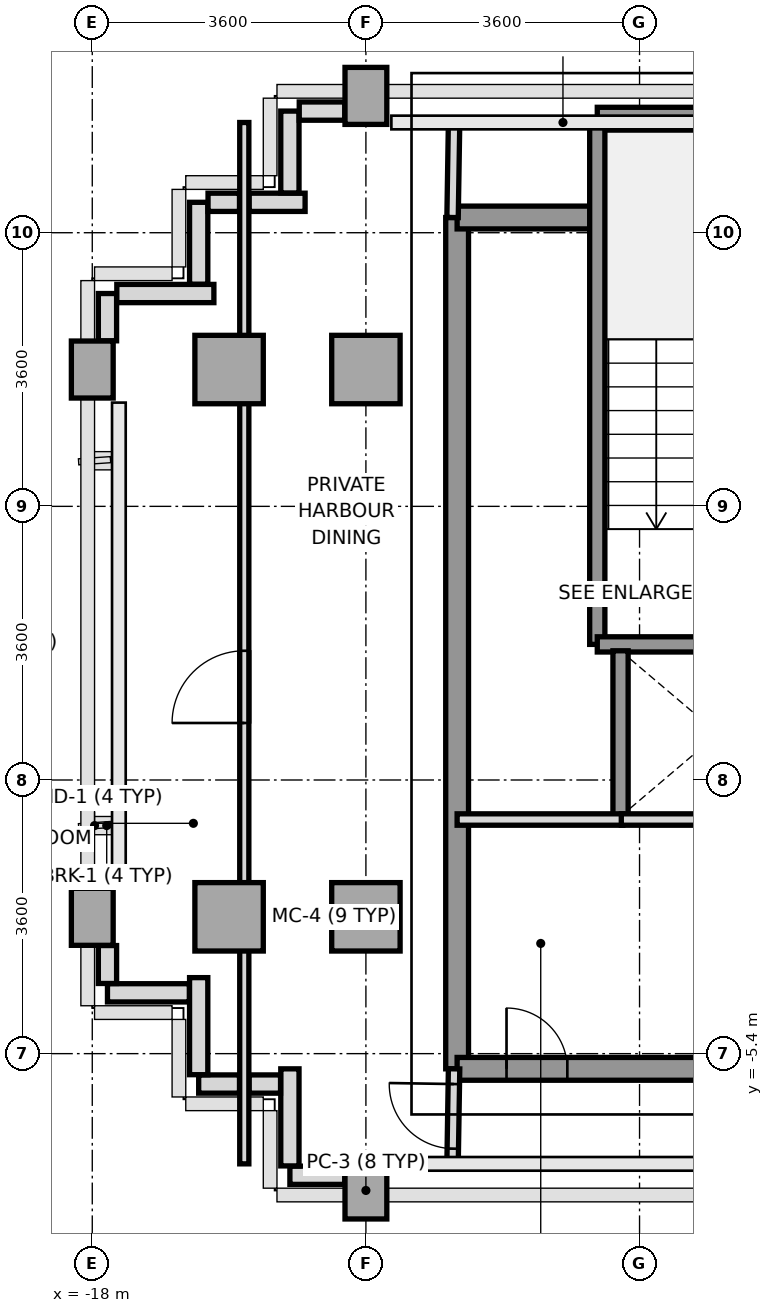
"""IFC4 building model, lengths in metres.
Left out: names, types, materials, properties, quantities, classifications, styles, units other than length and angle.
Written with IfcOpenShell. Run it as: python <this file> out.ifc"""

import sys

from ifc_helpers import new_model, si_unit, direction, frame, frame_2d, origin, origin_2d, place, context, subcontext, project, spatial, rectangle, extrude, source, transform, mapped, element, fill, save


model = new_model("IFC4")
c1 = context("Model", 3, precision=1e-05, world=origin(), true_north=direction((0.0, 1.0)))
c2 = subcontext(c1, "Body", "Model", "MODEL_VIEW")
j1 = project(units=[si_unit("LENGTHUNIT", "METRE"), si_unit("PLANEANGLEUNIT", "RADIAN")], contexts=[c1])
p1 = place(None, origin())
s1 = spatial("IfcSite", under=j1, at=p1, CompositionType="ELEMENT")
p2 = place(p1, origin())
s2 = spatial("IfcBuilding", under=s1, at=p2, CompositionType="ELEMENT")
p3 = place(p2, frame((0.0, 0.0, 246.0)))
s3 = spatial("IfcBuildingStorey", under=s2, at=p3, CompositionType="ELEMENT", Elevation=246.0)
m1 = source(origin(), c2, "Body", "SweptSolid", [
    extrude(rectangle(XDim=0.55, YDim=0.75, at=origin_2d()), origin(), (0.0, 0.0, 1.0), 3.01),
])
for number, where, z_axis, x_axis in (
    (1, (-18.0, -3.6, 0.0), (0.0, 0.0, 1.0), (1.0, 0.0, 0.0)),
    (2, (-18.0, 3.6, 0.0), (0.0, 0.0, 1.0), (1.0, 0.0, 0.0)),
):
    element("IfcColumn", number, at=place(p3, frame(where, z_axis=z_axis, x_axis=x_axis)), inside=s3, PredefinedType="COLUMN", context=c2, shape_type="MappedRepresentation", body=[
        mapped(m1, transform((0.0, 0.0, 0.0), x_axis=(1.0, 0.0, 0.0), y_axis=(0.0, 1.0, 0.0), z_axis=(0.0, 0.0, 1.0), scale=1.0)),
    ])
m2 = source(origin(), c2, "Body", "SweptSolid", [
    extrude(rectangle(XDim=0.9, YDim=0.9, at=origin_2d()), origin(), (0.0, 0.0, 1.0), 3.01),
])
for number, where, z_axis, x_axis in (
    (3, (-16.2, -3.6, 0.0), (0.0, 0.0, 1.0), (1.0, 0.0, 0.0)),
    (4, (-16.2, 3.6, 0.0), (0.0, 0.0, 1.0), (1.0, 0.0, 0.0)),
):
    element("IfcColumn", number, at=place(p3, frame(where, z_axis=z_axis, x_axis=x_axis)), inside=s3, PredefinedType="COLUMN", context=c2, shape_type="MappedRepresentation", body=[
        mapped(m2, transform((0.0, 0.0, 0.0), x_axis=(1.0, 0.0, 0.0), y_axis=(0.0, 1.0, 0.0), z_axis=(0.0, 0.0, 1.0), scale=1.0)),
    ])
p4 = place(p3, frame((-14.4, -7.2, 0.0), z_axis=(0.0, 0.0, 1.0), x_axis=(1.0, 0.0, 0.0)))
e5 = element("IfcColumn", 5, at=p4, inside=s3, PredefinedType="COLUMN", context=c2, shape_type="MappedRepresentation", body=[
    mapped(m1, transform((0.0, 0.0, 0.0), x_axis=(1.0, 0.0, 0.0), y_axis=(0.0, 1.0, 0.0), z_axis=(0.0, 0.0, 1.0), scale=1.0)),
])
for number, where, z_axis, x_axis in (
    (6, (-14.4, -3.6, 0.0), (0.0, 0.0, 1.0), (1.0, 0.0, 0.0)),
    (7, (-14.4, 3.6, 0.0), (0.0, 0.0, 1.0), (1.0, 0.0, 0.0)),
):
    element("IfcColumn", number, at=place(p3, frame(where, z_axis=z_axis, x_axis=x_axis)), inside=s3, PredefinedType="COLUMN", context=c2, shape_type="MappedRepresentation", body=[
        mapped(m2, transform((0.0, 0.0, 0.0), x_axis=(1.0, 0.0, 0.0), y_axis=(0.0, 1.0, 0.0), z_axis=(0.0, 0.0, 1.0), scale=1.0)),
    ])
p5 = place(p3, frame((-14.4, 7.2, 0.0), z_axis=(0.0, 0.0, 1.0), x_axis=(1.0, 0.0, 0.0)))
e8 = element("IfcColumn", 8, at=p5, inside=s3, PredefinedType="COLUMN", context=c2, shape_type="MappedRepresentation", body=[
    mapped(m1, transform((0.0, 0.0, 0.0), x_axis=(1.0, 0.0, 0.0), y_axis=(0.0, 1.0, 0.0), z_axis=(0.0, 0.0, 1.0), scale=1.0)),
])
p6 = place(p3, frame((-14.678, -7.0, 0.0), z_axis=(0.0, 0.0, 1.0), x_axis=(-1.0, 0.0, 0.0)))
e9 = element("IfcWall", 9, at=p6, inside=s3, PredefinedType="PARAPET", context=c2, shape_type="SweptSolid", body=[
    extrude(rectangle(XDim=0.722, YDim=0.24, at=frame_2d((0.361, 0.0))), origin(), (0.0, 0.0, 1.0), 1.15),
])
p7 = place(p3, frame((-15.4, -6.877, 0.0), z_axis=(0.0, 0.0, 1.0), x_axis=(0.0, 1.0, 0.0)))
e10 = element("IfcWall", 10, at=p7, inside=s3, PredefinedType="PARAPET", context=c2, shape_type="SweptSolid", body=[
    extrude(rectangle(XDim=1.277, YDim=0.24, at=frame_2d((0.638, 0.0))), origin(), (0.0, 0.0, 1.0), 1.15),
])
p8 = place(p3, frame((-15.523, -5.8, 0.0), z_axis=(0.0, 0.0, 1.0), x_axis=(-1.0, 0.0, 0.0)))
e11 = element("IfcWall", 11, at=p8, inside=s3, PredefinedType="PARAPET", context=c2, shape_type="SweptSolid", body=[
    extrude(rectangle(XDim=0.414, YDim=0.24, at=frame_2d((0.207, 0.0))), origin(), (0.0, 0.0, 1.0), 1.15),
])
p9 = place(p3, frame((-16.063, -5.8, 0.0), z_axis=(0.0, 0.0, 1.0), x_axis=(-1.0, 0.0, 0.0)))
e12 = element("IfcWall", 12, at=p9, inside=s3, PredefinedType="PARAPET", context=c2, shape_type="SweptSolid", body=[
    extrude(rectangle(XDim=0.537, YDim=0.24, at=frame_2d((0.269, 0.0))), origin(), (0.0, 0.0, 1.0), 1.15),
])
p10 = place(p3, frame((-16.6, -5.677, 0.0), z_axis=(0.0, 0.0, 1.0), x_axis=(0.0, 1.0, 0.0)))
e13 = element("IfcWall", 13, at=p10, inside=s3, PredefinedType="PARAPET", context=c2, shape_type="SweptSolid", body=[
    extrude(rectangle(XDim=1.277, YDim=0.24, at=frame_2d((0.639, 0.0))), origin(), (0.0, 0.0, 1.0), 1.15),
])
p11 = place(p3, frame((-16.723, -4.6, 0.0), z_axis=(0.0, 0.0, 1.0), x_axis=(-1.0, 0.0, 0.0)))
e14 = element("IfcWall", 14, at=p11, inside=s3, PredefinedType="PARAPET", context=c2, shape_type="SweptSolid", body=[
    extrude(rectangle(XDim=1.077, YDim=0.24, at=frame_2d((0.539, 0.0))), origin(), (0.0, 0.0, 1.0), 1.15),
])
p12 = place(p3, frame((-17.8, -4.477, 0.0), z_axis=(0.0, 0.0, 1.0), x_axis=(0.0, 1.0, 0.0)))
e15 = element("IfcWall", 15, at=p12, inside=s3, PredefinedType="PARAPET", context=c2, shape_type="SweptSolid", body=[
    extrude(rectangle(XDim=0.499, YDim=0.24, at=frame_2d((0.25, 0.0))), origin(), (0.0, 0.0, 1.0), 1.15),
])
p13 = place(p3, frame((-17.8, 3.978, 0.0), z_axis=(0.0, 0.0, 1.0), x_axis=(0.0, 1.0, 0.0)))
e16 = element("IfcWall", 16, at=p13, inside=s3, PredefinedType="PARAPET", context=c2, shape_type="SweptSolid", body=[
    extrude(rectangle(XDim=0.622, YDim=0.24, at=frame_2d((0.311, 0.0))), origin(), (0.0, 0.0, 1.0), 1.15),
])
p14 = place(p3, frame((-17.677, 4.6, 0.0), z_axis=(0.0, 0.0, 1.0), x_axis=(1.0, 0.0, 0.0)))
e17 = element("IfcWall", 17, at=p14, inside=s3, PredefinedType="PARAPET", context=c2, shape_type="SweptSolid", body=[
    extrude(rectangle(XDim=1.277, YDim=0.24, at=frame_2d((0.639, 0.0))), origin(), (0.0, 0.0, 1.0), 1.15),
])
p15 = place(p3, frame((-16.6, 4.723, 0.0), z_axis=(0.0, 0.0, 1.0), x_axis=(0.0, 1.0, 0.0)))
e18 = element("IfcWall", 18, at=p15, inside=s3, PredefinedType="PARAPET", context=c2, shape_type="SweptSolid", body=[
    extrude(rectangle(XDim=1.077, YDim=0.24, at=frame_2d((0.539, 0.0))), origin(), (0.0, 0.0, 1.0), 1.15),
])
p16 = place(p3, frame((-16.477, 5.8, 0.0), z_axis=(0.0, 0.0, 1.0), x_axis=(1.0, 0.0, 0.0)))
e19 = element("IfcWall", 19, at=p16, inside=s3, PredefinedType="PARAPET", context=c2, shape_type="SweptSolid", body=[
    extrude(rectangle(XDim=0.414, YDim=0.24, at=frame_2d((0.207, 0.0))), origin(), (0.0, 0.0, 1.0), 1.15),
])
p17 = place(p3, frame((-15.937, 5.8, 0.0), z_axis=(0.0, 0.0, 1.0), x_axis=(1.0, 0.0, 0.0)))
e20 = element("IfcWall", 20, at=p17, inside=s3, PredefinedType="PARAPET", context=c2, shape_type="SweptSolid", body=[
    extrude(rectangle(XDim=0.737, YDim=0.24, at=frame_2d((0.369, 0.0))), origin(), (0.0, 0.0, 1.0), 1.15),
])
p18 = place(p3, frame((-15.4, 5.923, 0.0), z_axis=(0.0, 0.0, 1.0), x_axis=(0.0, 1.0, 0.0)))
e21 = element("IfcWall", 21, at=p18, inside=s3, PredefinedType="PARAPET", context=c2, shape_type="SweptSolid", body=[
    extrude(rectangle(XDim=1.077, YDim=0.24, at=frame_2d((0.539, 0.0))), origin(), (0.0, 0.0, 1.0), 1.15),
])
p19 = place(p3, frame((-15.277, 7.0, 0.0), z_axis=(0.0, 0.0, 1.0), x_axis=(1.0, 0.0, 0.0)))
e22 = element("IfcWall", 22, at=p19, inside=s3, PredefinedType="PARAPET", context=c2, shape_type="SweptSolid", body=[
    extrude(rectangle(XDim=0.599, YDim=0.24, at=frame_2d((0.3, 0.0))), origin(), (0.0, 0.0, 1.0), 1.15),
])
p20 = place(p3, frame((-13.2, -5.6, 0.0), z_axis=(0.0, 0.0, 1.0), x_axis=(0.0, 1.0, 0.0)))
e23 = element("IfcWall", 23, at=p20, inside=s3, PredefinedType="SHEAR", context=c2, shape_type="SweptSolid", body=[
    extrude(rectangle(XDim=11.2, YDim=0.3, at=frame_2d((5.6, 0.0))), origin(), (0.0, 0.0, 1.0), 3.01),
])
p21 = place(p3, frame((-11.356, 6.9, 0.0), z_axis=(0.0, 0.0, 1.0), x_axis=(1.0, 0.0, 0.0)))
e24 = element("IfcWall", 24, at=p21, inside=s3, PredefinedType="SHEAR", context=c2, shape_type="SweptSolid", body=[
    extrude(rectangle(XDim=5.956, YDim=0.3, at=frame_2d((2.978, 0.0))), origin(), (0.0, 0.0, 1.0), 3.01),
])
p22 = place(p3, frame((-13.2, 5.6, 0.0), z_axis=(0.0, 0.0, 1.0), x_axis=(1.0, 0.0, 0.0)))
e25 = element("IfcWall", 25, at=p22, inside=s3, PredefinedType="SHEAR", context=c2, shape_type="SweptSolid", body=[
    extrude(rectangle(XDim=1.844, YDim=0.3, at=frame_2d((0.922, 0.0))), origin(), (0.0, 0.0, 1.0), 3.01),
])
p23 = place(p3, frame((-13.2, -5.6, 0.0), z_axis=(0.0, 0.0, 1.0), x_axis=(1.0, 0.0, 0.0)))
e26 = element("IfcWall", 26, at=p23, inside=s3, PredefinedType="SHEAR", context=c2, shape_type="SweptSolid", body=[
    extrude(rectangle(XDim=7.8, YDim=0.3, at=frame_2d((3.9, 0.0))), origin(), (0.0, 0.0, 1.0), 3.01),
])
p24 = place(p23, frame((0.65, 0.0, 0.0)))
e27 = element("IfcOpeningElement", 27, at=p24, cuts=e26, PredefinedType="OPENING", context=c2, shape_type="SweptSolid", body=[
    extrude(rectangle(XDim=0.8, YDim=2.1, at=frame_2d((0.4, 1.05))), frame((0.0, 0.16, 0.0), z_axis=(0.0, -1.0, 0.0), x_axis=(1.0, 0.0, 0.0)), (0.0, 0.0, 1.0), 0.32),
])
p25 = place(p23, frame((4.2, 0.0, 0.0)))
e28 = element("IfcOpeningElement", 28, at=p25, cuts=e26, PredefinedType="OPENING", context=c2, shape_type="SweptSolid", body=[
    extrude(rectangle(XDim=0.95, YDim=2.15, at=frame_2d((0.475, 1.075))), frame((0.0, 0.16, 0.0), z_axis=(0.0, -1.0, 0.0), x_axis=(1.0, 0.0, 0.0)), (0.0, 0.0, 1.0), 0.32),
])
p26 = place(p3, frame((-11.356, -0.016, 0.0), z_axis=(0.0, 0.0, 1.0), x_axis=(0.0, 1.0, 0.0)))
e29 = element("IfcWall", 29, at=p26, inside=s3, PredefinedType="SOLIDWALL", context=c2, shape_type="SweptSolid", body=[
    extrude(rectangle(XDim=6.916, YDim=0.2, at=frame_2d((3.458, 0.0))), origin(), (0.0, 0.0, 1.0), 3.01),
])
p27 = place(p3, frame((-11.356, -0.016, 0.0), z_axis=(0.0, 0.0, 1.0), x_axis=(1.0, 0.0, 0.0)))
e30 = element("IfcWall", 30, at=p27, inside=s3, PredefinedType="SOLIDWALL", context=c2, shape_type="SweptSolid", body=[
    extrude(rectangle(XDim=3.152, YDim=0.2, at=frame_2d((1.576, 0.0))), origin(), (0.0, 0.0, 1.0), 3.01),
])
p28 = place(p3, frame((-11.05, -2.28, 0.0), z_axis=(0.0, 0.0, 1.0), x_axis=(0.0, 1.0, 0.0)))
e31 = element("IfcWall", 31, at=p28, inside=s3, PredefinedType="SOLIDWALL", context=c2, shape_type="SweptSolid", body=[
    extrude(rectangle(XDim=2.18, YDim=0.2, at=frame_2d((1.09, 0.0))), origin(), (0.0, 0.0, 1.0), 3.01),
])
p29 = place(p3, frame((-13.2, -2.32, 0.0), z_axis=(0.0, 0.0, 1.0), x_axis=(1.0, 0.0, 0.0)))
e32 = element("IfcWall", 32, at=p29, inside=s3, PredefinedType="PARTITIONING", context=c2, shape_type="SweptSolid", body=[
    extrude(rectangle(XDim=2.18, YDim=0.15, at=frame_2d((1.09, 0.0))), origin(), (0.0, 0.0, 1.0), 3.01),
])
p30 = place(p3, frame((-11.04, -2.32, 0.0), z_axis=(0.0, 0.0, 1.0), x_axis=(1.0, 0.0, 0.0)))
e33 = element("IfcWall", 33, at=p30, inside=s3, PredefinedType="PARTITIONING", context=c2, shape_type="SweptSolid", body=[
    extrude(rectangle(XDim=2.56, YDim=0.15, at=frame_2d((1.28, 0.0))), origin(), (0.0, 0.0, 1.0), 3.01),
])
p31 = place(p3, frame((-13.26, 5.6, 0.0), z_axis=(0.0, 0.0, 1.0), x_axis=(0.016013571389, 0.999871774545, 0.0)))
e34 = element("IfcWall", 34, at=p31, inside=s3, PredefinedType="PARTITIONING", context=c2, shape_type="SweptSolid", body=[
    extrude(rectangle(XDim=1.25, YDim=0.15, at=frame_2d((0.625, 0.0))), origin(), (0.0, 0.0, 1.0), 3.01),
])
p32 = place(p3, frame((-13.26, -6.85, 0.0), z_axis=(0.0, 0.0, 1.0), x_axis=(0.016013571389, 0.999871774545, 0.0)))
e35 = element("IfcWall", 35, at=p32, inside=s3, PredefinedType="PARTITIONING", context=c2, shape_type="SweptSolid", body=[
    extrude(rectangle(XDim=1.25, YDim=0.15, at=frame_2d((0.625, 0.0))), origin(), (0.0, 0.0, 1.0), 3.01),
])
p33 = place(p32, frame((0.2, 0.0, 0.0)))
e36 = element("IfcOpeningElement", 36, at=p33, cuts=e35, PredefinedType="OPENING", context=c2, shape_type="SweptSolid", body=[
    extrude(rectangle(XDim=0.85, YDim=2.1, at=frame_2d((0.425, 1.05))), frame((0.0, 0.085, 0.0), z_axis=(0.0, -1.0, 0.0), x_axis=(1.0, 0.0, 0.0)), (0.0, 0.0, 1.0), 0.17),
])
p34 = place(p3, frame((-16.0, -6.85, 0.0), z_axis=(0.0, 0.0, 1.0), x_axis=(0.0, 1.0, 0.0)))
e37 = element("IfcWall", 37, at=p34, inside=s3, PredefinedType="PARTITIONING", context=c2, shape_type="SweptSolid", body=[
    extrude(rectangle(XDim=13.7, YDim=0.12, at=frame_2d((6.85, 0.0))), origin(), (0.0, 0.0, 1.0), 3.01),
])
p35 = place(p34, frame((5.8, 0.0, 0.0)))
e38 = element("IfcOpeningElement", 38, at=p35, cuts=e37, PredefinedType="OPENING", context=c2, shape_type="SweptSolid", body=[
    extrude(rectangle(XDim=0.95, YDim=2.15, at=frame_2d((0.475, 1.075))), frame((0.0, 0.07, 0.0), z_axis=(0.0, -1.0, 0.0), x_axis=(1.0, 0.0, 0.0)), (0.0, 0.0, 1.0), 0.14),
])
m3 = source(origin(), c2, "Body", "SweptSolid", [
    extrude(rectangle(XDim=0.8, YDim=2.1, at=frame_2d((0.4, 1.05))), frame((0.0, 0.025, 0.0), z_axis=(0.0, -1.0, 0.0), x_axis=(1.0, 0.0, 0.0)), (0.0, 0.0, 1.0), 0.05),
])
p36 = place(p24, origin())
e39 = element("IfcDoor", 39, at=p36, inside=s3, OperationType="SINGLE_SWING_LEFT", PredefinedType="DOOR", context=c2, shape_type="MappedRepresentation", body=[
    mapped(m3, transform((0.0, 0.0, 0.0), x_axis=(1.0, 0.0, 0.0), y_axis=(0.0, 1.0, 0.0), z_axis=(0.0, 0.0, 1.0), scale=1.0)),
])
fill(e27, e39)
m4 = source(origin(), c2, "Body", "SweptSolid", [
    extrude(rectangle(XDim=0.85, YDim=2.1, at=frame_2d((0.425, 1.05))), frame((0.0, 0.025, 0.0), z_axis=(0.0, -1.0, 0.0), x_axis=(1.0, 0.0, 0.0)), (0.0, 0.0, 1.0), 0.05),
])
p37 = place(p33, origin())
e40 = element("IfcDoor", 40, at=p37, inside=s3, OperationType="SINGLE_SWING_RIGHT", PredefinedType="DOOR", context=c2, shape_type="MappedRepresentation", body=[
    mapped(m4, transform((0.0, 0.0, 0.0), x_axis=(1.0, 0.0, 0.0), y_axis=(0.0, 1.0, 0.0), z_axis=(0.0, 0.0, 1.0), scale=1.0)),
])
fill(e36, e40)
m5 = source(origin(), c2, "Body", "SweptSolid", [
    extrude(rectangle(XDim=0.95, YDim=2.15, at=frame_2d((0.475, 1.075))), frame((0.0, 0.025, 0.0), z_axis=(0.0, -1.0, 0.0), x_axis=(1.0, 0.0, 0.0)), (0.0, 0.0, 1.0), 0.05),
])
p38 = place(p35, origin())
e41 = element("IfcDoor", 41, at=p38, inside=s3, OperationType="SINGLE_SWING_LEFT", PredefinedType="DOOR", context=c2, shape_type="MappedRepresentation", body=[
    mapped(m5, transform((0.0, 0.0, 0.0), x_axis=(1.0, 0.0, 0.0), y_axis=(0.0, 1.0, 0.0), z_axis=(0.0, 0.0, 1.0), scale=1.0)),
])
fill(e38, e41)
save(model, sys.argv[1])
